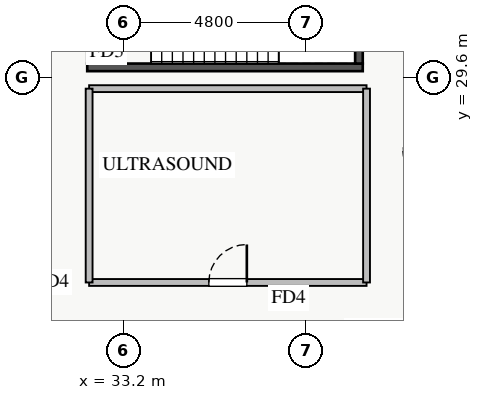
"""IFC4 building model, lengths in metres.
Left out: names, types, materials, properties, quantities, classifications, styles, units other than length and angle.
Written with IfcOpenShell. Run it as: python <this file> out.ifc"""

import sys

from ifc_helpers import new_model, si_unit, direction, frame, frame_2d, origin, place, context, subcontext, project, spatial, rectangle, extrude, source, transform, mapped, element, fill, save


model = new_model("IFC4")
c1 = context("Model", 3, precision=1e-05, world=origin(), true_north=direction((0.0, 1.0)))
c2 = subcontext(c1, "Body", "Model", "MODEL_VIEW")
j1 = project(units=[si_unit("LENGTHUNIT", "METRE"), si_unit("PLANEANGLEUNIT", "RADIAN")], contexts=[c1])
p1 = place(None, origin())
s1 = spatial("IfcSite", under=j1, at=p1, CompositionType="ELEMENT")
p2 = place(p1, origin())
s2 = spatial("IfcBuilding", under=s1, at=p2, CompositionType="ELEMENT")
p3 = place(p2, frame((0.0, 0.0, 13.8)))
s3 = spatial("IfcBuildingStorey", under=s2, at=p3, CompositionType="ELEMENT", Elevation=13.8)
p4 = place(p3, frame((32.25, 29.86, 0.0), z_axis=(0.0, 0.0, 1.0), x_axis=(1.0, 0.0, 0.0)))
e1 = element("IfcWall", 1, at=p4, inside=s3, PredefinedType="SHEAR", context=c2, shape_type="SweptSolid", body=[
    extrude(rectangle(XDim=7.25, YDim=0.2, at=frame_2d((3.625, 0.0))), origin(), (0.0, 0.0, 1.0), 4.4),
])
p5 = place(p3, frame((32.35, 29.96, 0.0), z_axis=(0.0, 0.0, 1.0), x_axis=(0.0, 1.0, 0.0)))
e2 = element("IfcWall", 2, at=p5, inside=s3, PredefinedType="SHEAR", context=c2, shape_type="SweptSolid", body=[
    extrude(rectangle(XDim=3.04, YDim=0.2, at=frame_2d((1.52, 0.0))), origin(), (0.0, 0.0, 1.0), 4.4),
])
p6 = place(p5, frame((0.95, 0.0, 0.0)))
e3 = element("IfcOpeningElement", 3, at=p6, cuts=e2, PredefinedType="OPENING", context=c2, shape_type="SweptSolid", body=[
    extrude(rectangle(XDim=1.1, YDim=2.05, at=frame_2d((0.55, 1.025))), frame((0.0, 0.11, 0.0), z_axis=(0.0, -1.0, 0.0), x_axis=(1.0, 0.0, 0.0)), (0.0, 0.0, 1.0), 0.22),
])
p7 = place(p3, frame((39.4, 29.96, 0.0), z_axis=(0.0, 0.0, 1.0), x_axis=(0.0, 1.0, 0.0)))
e4 = element("IfcWall", 4, at=p7, inside=s3, PredefinedType="SHEAR", context=c2, shape_type="SweptSolid", body=[
    extrude(rectangle(XDim=3.04, YDim=0.2, at=frame_2d((1.52, 0.0))), origin(), (0.0, 0.0, 1.0), 4.4),
])
p8 = place(p3, frame((32.3, 24.2, 0.0), z_axis=(0.0, 0.0, 1.0), x_axis=(1.0, 0.0, 0.0)))
e5 = element("IfcWall", 5, at=p8, inside=s3, PredefinedType="PARTITIONING", context=c2, shape_type="SweptSolid", body=[
    extrude(rectangle(XDim=7.3, YDim=0.18, at=frame_2d((3.65, 0.0))), origin(), (0.0, 0.0, 1.0), 4.15),
])
p9 = place(p8, frame((3.15, 0.0, 0.0)))
e6 = element("IfcOpeningElement", 6, at=p9, cuts=e5, PredefinedType="OPENING", context=c2, shape_type="SweptSolid", body=[
    extrude(rectangle(XDim=1.0, YDim=2.05, at=frame_2d((0.5, 1.025))), frame((0.0, 0.1, 0.0), z_axis=(0.0, -1.0, 0.0), x_axis=(1.0, 0.0, 0.0)), (0.0, 0.0, 1.0), 0.2),
])
p10 = place(p3, frame((32.3, 29.3, 0.0), z_axis=(0.0, 0.0, 1.0), x_axis=(1.0, 0.0, 0.0)))
e7 = element("IfcWall", 7, at=p10, inside=s3, PredefinedType="PARTITIONING", context=c2, shape_type="SweptSolid", body=[
    extrude(rectangle(XDim=7.3, YDim=0.18, at=frame_2d((3.65, 0.0))), origin(), (0.0, 0.0, 1.0), 3.445),
])
for number, where, z_axis, x_axis in (
    (8, (32.3, 24.2, 0.0), (0.0, 0.0, 1.0), (0.0, 1.0, 0.0)),
    (9, (39.6, 24.2, 0.0), (0.0, 0.0, 1.0), (0.0, 1.0, 0.0)),
):
    element("IfcWall", number, at=place(p3, frame(where, z_axis=z_axis, x_axis=x_axis)), inside=s3, PredefinedType="PARTITIONING", context=c2, shape_type="SweptSolid", body=[
        extrude(rectangle(XDim=5.1, YDim=0.18, at=frame_2d((2.55, 0.0))), origin(), (0.0, 0.0, 1.0), 4.15),
    ])
m1 = source(origin(), c2, "Body", "SweptSolid", [
    extrude(rectangle(XDim=1.0, YDim=2.05, at=frame_2d((0.5, 1.025))), frame((0.0, 0.025, 0.0), z_axis=(0.0, -1.0, 0.0), x_axis=(1.0, 0.0, 0.0)), (0.0, 0.0, 1.0), 0.05),
])
p11 = place(p9, origin())
e10 = element("IfcDoor", 10, at=p11, inside=s3, OperationType="SINGLE_SWING_RIGHT", PredefinedType="DOOR", context=c2, shape_type="MappedRepresentation", body=[
    mapped(m1, transform((0.0, 0.0, 0.0), x_axis=(1.0, 0.0, 0.0), y_axis=(0.0, 1.0, 0.0), z_axis=(0.0, 0.0, 1.0), scale=1.0)),
])
fill(e6, e10)
save(model, sys.argv[1])
